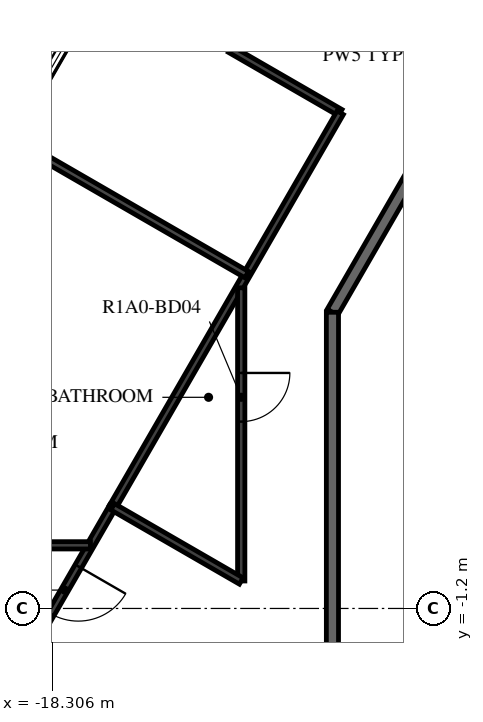
"""IFC4 building model, lengths in metres.
Left out: names, types, materials, properties, quantities, classifications, styles, units other than length and angle.
Written with IfcOpenShell. Run it as: python <this file> out.ifc"""

import sys

from ifc_helpers import new_model, si_unit, direction, frame, frame_2d, origin, place, context, subcontext, project, spatial, rectangle, extrude, element, fill, save


model = new_model("IFC4")
c1 = context("Model", 3, precision=1e-05, world=origin(), true_north=direction((0.0, 1.0)))
c2 = subcontext(c1, "Body", "Model", "MODEL_VIEW")
j1 = project(units=[si_unit("LENGTHUNIT", "METRE"), si_unit("PLANEANGLEUNIT", "RADIAN")], contexts=[c1])
p1 = place(None, origin())
s1 = spatial("IfcSite", under=j1, at=p1, CompositionType="ELEMENT")
p2 = place(p1, origin())
s2 = spatial("IfcBuilding", under=s1, at=p2, CompositionType="ELEMENT")
p3 = place(p2, frame((0.0, 0.0, 45.4)))
s3 = spatial("IfcBuildingStorey", under=s2, at=p3, CompositionType="ELEMENT", Elevation=45.4)
p4 = place(p3, frame((-10.029, 10.029, 0.0), z_axis=(0.0, 0.0, 1.0), x_axis=(-0.500001669485, -0.866024439905, 0.0)))
e1 = element("IfcWall", 1, at=p4, inside=s3, PredefinedType="STANDARD", context=c2, shape_type="SweptSolid", body=[
    extrude(rectangle(XDim=7.342, YDim=0.2, at=frame_2d((3.671, 0.0))), origin(), (0.0, 0.0, 1.0), 3.12),
])
p5 = place(p4, frame((0.2, 0.0, 0.0)))
e2 = element("IfcOpeningElement", 2, at=p5, cuts=e1, PredefinedType="OPENING", context=c2, shape_type="SweptSolid", body=[
    extrude(rectangle(XDim=1.0, YDim=2.1, at=frame_2d((0.5, 1.05))), frame((0.0, 0.11, 0.0), z_axis=(0.0, -1.0, 0.0), x_axis=(1.0, 0.0, 0.0)), (0.0, 0.0, 1.0), 0.22),
])
p6 = place(p3, frame((-13.7, 3.671, 0.0), z_axis=(0.0, 0.0, 1.0), x_axis=(0.0, -1.0, 0.0)))
e3 = element("IfcWall", 3, at=p6, inside=s3, PredefinedType="STANDARD", context=c2, shape_type="SweptSolid", body=[
    extrude(rectangle(XDim=7.342, YDim=0.2, at=frame_2d((3.671, 0.0))), origin(), (0.0, 0.0, 1.0), 3.12),
])
p7 = place(p3, frame((-15.382, 7.997, 0.0), z_axis=(0.0, 0.0, 1.0), x_axis=(0.866041603473, -0.499971940267, 0.0)))
e4 = element("IfcWall", 4, at=p7, inside=s3, PredefinedType="PARTITIONING", context=c2, shape_type="SweptSolid", body=[
    extrude(rectangle(XDim=2.089, YDim=0.12, at=frame_2d((1.045, 0.0))), origin(), (0.0, 0.0, 1.0), 3.12),
])
p8 = place(p3, frame((-13.572, 6.953, 0.0), z_axis=(0.0, 0.0, 1.0), x_axis=(-0.499981332661, -0.866036181109, 0.0)))
e5 = element("IfcWall", 5, at=p8, inside=s3, PredefinedType="PARTITIONING", context=c2, shape_type="SweptSolid", body=[
    extrude(rectangle(XDim=7.483, YDim=0.12, at=frame_2d((3.742, 0.0))), origin(), (0.0, 0.0, 1.0), 3.12),
])
p9 = place(p3, frame((-17.313, 0.472, 0.0), z_axis=(0.0, 0.0, 1.0), x_axis=(-0.499999047218, -0.866025953873, 0.0)))
e6 = element("IfcWall", 6, at=p9, inside=s3, PredefinedType="PARTITIONING", context=c2, shape_type="SweptSolid", body=[
    extrude(rectangle(XDim=11.639, YDim=0.12, at=frame_2d((5.82, 0.0))), origin(), (0.0, 0.0, 1.0), 3.12),
])
p10 = place(p9, frame((1.132, 0.0, 0.0)))
e7 = element("IfcOpeningElement", 7, at=p10, cuts=e6, PredefinedType="OPENING", context=c2, shape_type="SweptSolid", body=[
    extrude(rectangle(XDim=0.9, YDim=2.1, at=frame_2d((0.45, 1.05))), frame((0.0, 0.07, 0.0), z_axis=(0.0, -1.0, 0.0), x_axis=(1.0, 0.0, 0.0)), (0.0, 0.0, 1.0), 0.14),
])
p11 = place(p9, frame((8.083, 0.0, 0.0)))
e8 = element("IfcOpeningElement", 8, at=p11, cuts=e6, PredefinedType="OPENING", context=c2, shape_type="SweptSolid", body=[
    extrude(rectangle(XDim=0.9, YDim=2.1, at=frame_2d((0.45, 1.05))), frame((0.0, 0.07, 0.0), z_axis=(0.0, -1.0, 0.0), x_axis=(1.0, 0.0, 0.0)), (0.0, 0.0, 1.0), 0.14),
])
p12 = place(p3, frame((-15.2, 4.073, 0.0), z_axis=(0.0, 0.0, 1.0), x_axis=(0.0, -1.0, 0.0)))
e9 = element("IfcWall", 9, at=p12, inside=s3, PredefinedType="PARTITIONING", context=c2, shape_type="SweptSolid", body=[
    extrude(rectangle(XDim=4.821, YDim=0.12, at=frame_2d((2.411, 0.0))), origin(), (0.0, 0.0, 1.0), 3.12),
])
p13 = place(p12, frame((1.4, 0.0, 0.0)))
e10 = element("IfcOpeningElement", 10, at=p13, cuts=e9, PredefinedType="OPENING", context=c2, shape_type="SweptSolid", body=[
    extrude(rectangle(XDim=0.8, YDim=2.1, at=frame_2d((0.4, 1.05))), frame((0.0, 0.07, 0.0), z_axis=(0.0, -1.0, 0.0), x_axis=(1.0, 0.0, 0.0)), (0.0, 0.0, 1.0), 0.14),
])
p14 = place(p3, frame((-15.2, -0.748, 0.0), z_axis=(0.0, 0.0, 1.0), x_axis=(-0.866030657337, 0.49999090047, 0.0)))
e11 = element("IfcWall", 11, at=p14, inside=s3, PredefinedType="PARTITIONING", context=c2, shape_type="SweptSolid", body=[
    extrude(rectangle(XDim=2.44, YDim=0.12, at=frame_2d((1.22, 0.0))), origin(), (0.0, 0.0, 1.0), 3.12),
])
p15 = place(p3, frame((-18.92, 6.49, 0.0), z_axis=(0.0, 0.0, 1.0), x_axis=(0.865994303029, -0.500053864221, 0.0)))
e12 = element("IfcWall", 12, at=p15, inside=s3, PredefinedType="PARTITIONING", context=c2, shape_type="SweptSolid", body=[
    extrude(rectangle(XDim=4.4, YDim=0.12, at=frame_2d((2.2, 0.0))), origin(), (0.0, 0.0, 1.0), 2.73),
])
p16 = place(p3, frame((-22.76, -0.162, 0.0), z_axis=(0.0, 0.0, 1.0), x_axis=(1.0, 0.0, 0.0)))
e13 = element("IfcWall", 13, at=p16, inside=s3, PredefinedType="PARTITIONING", context=c2, shape_type="SweptSolid", body=[
    extrude(rectangle(XDim=5.081, YDim=0.12, at=frame_2d((2.54, 0.0))), origin(), (0.0, 0.0, 1.0), 3.12),
])
p17 = place(p16, frame((0.4, 0.0, 0.0)))
e14 = element("IfcOpeningElement", 14, at=p17, cuts=e13, PredefinedType="OPENING", context=c2, shape_type="SweptSolid", body=[
    extrude(rectangle(XDim=0.9, YDim=2.1, at=frame_2d((0.45, 1.05))), frame((0.0, 0.07, 0.0), z_axis=(0.0, -1.0, 0.0), x_axis=(1.0, 0.0, 0.0)), (0.0, 0.0, 1.0), 0.14),
])
p18 = place(p13, origin())
e15 = element("IfcDoor", 15, at=p18, inside=s3, OperationType="SINGLE_SWING_RIGHT", PredefinedType="DOOR", context=c2, shape_type="SweptSolid", body=[
    extrude(rectangle(XDim=0.8, YDim=2.1, at=frame_2d((0.4, 1.05))), frame((0.0, 0.025, 0.0), z_axis=(0.0, -1.0, 0.0), x_axis=(1.0, 0.0, 0.0)), (0.0, 0.0, 1.0), 0.05),
])
fill(e10, e15)
p19 = place(p10, origin())
e16 = element("IfcDoor", 16, at=p19, inside=s3, OperationType="SINGLE_SWING_RIGHT", PredefinedType="DOOR", context=c2, shape_type="SweptSolid", body=[
    extrude(rectangle(XDim=0.9, YDim=2.1, at=frame_2d((0.45, 1.05))), frame((0.0, 0.025, 0.0), z_axis=(0.0, -1.0, 0.0), x_axis=(1.0, 0.0, 0.0)), (0.0, 0.0, 1.0), 0.05),
])
fill(e7, e16)
save(model, sys.argv[1])
